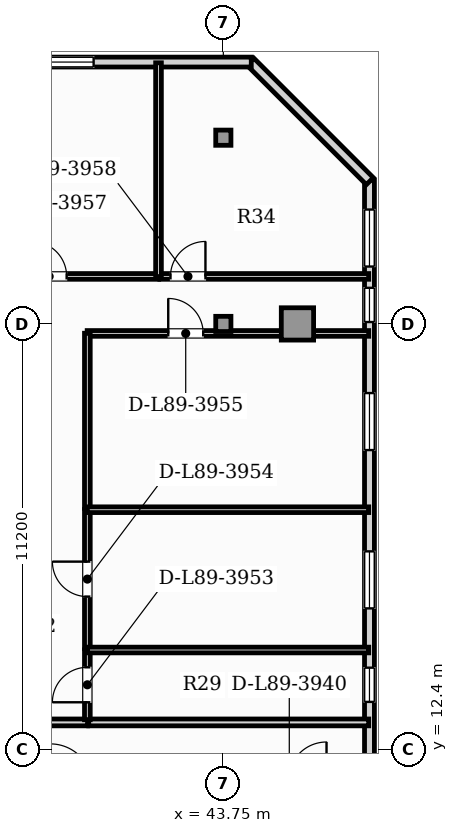
"""IFC4 building model, lengths in metres.
Left out: names, types, materials, properties, quantities, classifications, styles, units other than length and angle.
Written with IfcOpenShell. Run it as: python <this file> out.ifc"""

import sys

from ifc_helpers import new_model, si_unit, direction, frame, frame_2d, origin, origin_2d, place, context, subcontext, project, spatial, rectangle, hollow_rectangle, extrude, element, fill, save


model = new_model("IFC4")
c1 = context("Model", 3, precision=1e-05, world=origin(), true_north=direction((0.0, 1.0)))
c2 = subcontext(c1, "Body", "Model", "MODEL_VIEW")
j1 = project(units=[si_unit("LENGTHUNIT", "METRE"), si_unit("PLANEANGLEUNIT", "RADIAN")], contexts=[c1])
p1 = place(None, origin())
s1 = spatial("IfcSite", under=j1, at=p1, CompositionType="ELEMENT")
p2 = place(p1, origin())
s2 = spatial("IfcBuilding", under=s1, at=p2, CompositionType="ELEMENT")
p3 = place(p2, frame((0.0, 0.0, 362.25)))
s3 = spatial("IfcBuildingStorey", under=s2, at=p3, CompositionType="ELEMENT", Elevation=362.25)
p4 = place(p3, frame((45.7, 23.6, 0.0), z_axis=(0.0, 0.0, 1.0), x_axis=(1.0, 0.0, 0.0)))
e1 = element("IfcColumn", 1, at=p4, inside=s3, PredefinedType="USERDEFINED", context=c2, shape_type="SweptSolid", body=[
    extrude(hollow_rectangle(XDim=0.85, YDim=0.85, WallThickness=0.05, at=origin_2d()), origin(), (0.0, 0.0, 1.0), 4.35),
])
for number, where, z_axis, x_axis in (
    (2, (43.75, 23.6, 0.0), (0.0, 0.0, 1.0), (1.0, 0.0, 0.0)),
    (3, (43.75, 28.5, 0.0), (0.0, 0.0, 1.0), (1.0, 0.0, 0.0)),
):
    element("IfcColumn", number, at=place(p3, frame(where, z_axis=z_axis, x_axis=x_axis)), inside=s3, PredefinedType="COLUMN", context=c2, shape_type="SweptSolid", body=[
        extrude(hollow_rectangle(XDim=0.4, YDim=0.4, WallThickness=0.02, at=origin_2d()), origin(), (0.0, 0.0, 1.0), 4.35),
    ])
p5 = place(p3, frame((47.595, 3.24, 0.0), z_axis=(0.0, 0.0, 1.0), x_axis=(0.0, 1.0, 0.0)))
e4 = element("IfcWall", 4, at=p5, inside=s3, PredefinedType="SOLIDWALL", context=c2, shape_type="SweptSolid", body=[
    extrude(rectangle(XDim=24.14, YDim=0.26, at=frame_2d((12.07, 0.0))), origin(), (0.0, 0.0, 1.0), 4.1),
])
p6 = place(p5, frame((0.77, 0.0, 0.9)))
e5 = element("IfcOpeningElement", 5, at=p6, cuts=e4, PredefinedType="OPENING", context=c2, shape_type="SweptSolid", body=[
    extrude(rectangle(XDim=1.5, YDim=1.95, at=frame_2d((0.75, 0.975))), frame((0.0, 0.14, 0.0), z_axis=(0.0, -1.0, 0.0), x_axis=(1.0, 0.0, 0.0)), (0.0, 0.0, 1.0), 0.28),
])
p7 = place(p5, frame((20.41, 0.0, 0.95)))
e6 = element("IfcOpeningElement", 6, at=p7, cuts=e4, PredefinedType="OPENING", context=c2, shape_type="SweptSolid", body=[
    extrude(rectangle(XDim=0.9, YDim=1.5, at=frame_2d((0.45, 0.75))), frame((0.0, 0.14, 0.0), z_axis=(0.0, -1.0, 0.0), x_axis=(1.0, 0.0, 0.0)), (0.0, 0.0, 1.0), 0.28),
])
p8 = place(p5, frame((10.415, 0.0, 0.95)))
e7 = element("IfcOpeningElement", 7, at=p8, cuts=e4, PredefinedType="OPENING", context=c2, shape_type="SweptSolid", body=[
    extrude(rectangle(XDim=0.9, YDim=1.5, at=frame_2d((0.45, 0.75))), frame((0.0, 0.14, 0.0), z_axis=(0.0, -1.0, 0.0), x_axis=(1.0, 0.0, 0.0)), (0.0, 0.0, 1.0), 0.28),
])
p9 = place(p5, frame((12.876, 0.0, 0.9)))
e8 = element("IfcOpeningElement", 8, at=p9, cuts=e4, PredefinedType="OPENING", context=c2, shape_type="SweptSolid", body=[
    extrude(rectangle(XDim=1.5, YDim=1.95, at=frame_2d((0.75, 0.975))), frame((0.0, 0.14, 0.0), z_axis=(0.0, -1.0, 0.0), x_axis=(1.0, 0.0, 0.0)), (0.0, 0.0, 1.0), 0.28),
])
p10 = place(p5, frame((17.041, 0.0, 0.9)))
e9 = element("IfcOpeningElement", 9, at=p10, cuts=e4, PredefinedType="OPENING", context=c2, shape_type="SweptSolid", body=[
    extrude(rectangle(XDim=1.5, YDim=1.95, at=frame_2d((0.75, 0.975))), frame((0.0, 0.14, 0.0), z_axis=(0.0, -1.0, 0.0), x_axis=(1.0, 0.0, 0.0)), (0.0, 0.0, 1.0), 0.28),
])
p11 = place(p5, frame((21.87, 0.0, 0.9)))
e10 = element("IfcOpeningElement", 10, at=p11, cuts=e4, PredefinedType="OPENING", context=c2, shape_type="SweptSolid", body=[
    extrude(rectangle(XDim=1.5, YDim=1.95, at=frame_2d((0.75, 0.975))), frame((0.0, 0.14, 0.0), z_axis=(0.0, -1.0, 0.0), x_axis=(1.0, 0.0, 0.0)), (0.0, 0.0, 1.0), 0.28),
])
p12 = place(p3, frame((47.605, 27.356, 0.0), z_axis=(0.0, 0.0, 1.0), x_axis=(-0.707106781187, 0.707106781187, 0.0)))
e11 = element("IfcWall", 11, at=p12, inside=s3, PredefinedType="SOLIDWALL", context=c2, shape_type="SweptSolid", body=[
    extrude(rectangle(XDim=4.445, YDim=0.26, at=frame_2d((2.223, 0.0))), origin(), (0.0, 0.0, 1.0), 4.1),
])
p13 = place(p3, frame((44.485, 30.49, 0.0), z_axis=(0.0, 0.0, 1.0), x_axis=(-1.0, 0.0, 0.0)))
e12 = element("IfcWall", 12, at=p13, inside=s3, PredefinedType="SOLIDWALL", context=c2, shape_type="SweptSolid", body=[
    extrude(rectangle(XDim=8.685, YDim=0.26, at=frame_2d((4.343, 0.0))), origin(), (0.0, 0.0, 1.0), 4.1),
])
p14 = place(p13, frame((4.148, 0.0, 0.9)))
e13 = element("IfcOpeningElement", 13, at=p14, cuts=e12, PredefinedType="OPENING", context=c2, shape_type="SweptSolid", body=[
    extrude(rectangle(XDim=1.5, YDim=1.95, at=frame_2d((0.75, 0.975))), frame((0.0, 0.14, 0.0), z_axis=(0.0, -1.0, 0.0), x_axis=(1.0, 0.0, 0.0)), (0.0, 0.0, 1.0), 0.28),
])
p15 = place(p3, frame((35.187, 13.115, 0.0), z_axis=(0.0, 0.0, 1.0), x_axis=(1.0, 0.0, 0.0)))
e14 = element("IfcWall", 14, at=p15, inside=s3, PredefinedType="PARTITIONING", context=c2, shape_type="SweptSolid", body=[
    extrude(rectangle(XDim=4.99, YDim=0.18, at=frame_2d((2.495, 0.0))), origin(), (0.0, 0.0, 1.0), 4.1),
])
p16 = place(p15, frame((1.995, 0.0, 0.0)))
e15 = element("IfcOpeningElement", 15, at=p16, cuts=e14, PredefinedType="OPENING", context=c2, shape_type="SweptSolid", body=[
    extrude(rectangle(XDim=1.0, YDim=2.15, at=frame_2d((0.5, 1.075))), frame((0.0, 0.1, 0.0), z_axis=(0.0, -1.0, 0.0), x_axis=(1.0, 0.0, 0.0)), (0.0, 0.0, 1.0), 0.2),
])
p17 = place(p3, frame((40.207, 13.115, 0.0), z_axis=(0.0, 0.0, 1.0), x_axis=(1.0, 0.0, 0.0)))
e16 = element("IfcWall", 16, at=p17, inside=s3, PredefinedType="PARTITIONING", context=c2, shape_type="SweptSolid", body=[
    extrude(rectangle(XDim=7.368, YDim=0.18, at=frame_2d((3.684, 0.0))), origin(), (0.0, 0.0, 1.0), 4.1),
])
p18 = place(p3, frame((40.172, 13.185, 0.0), z_axis=(0.0, 0.0, 1.0), x_axis=(0.0, 1.0, 0.0)))
e17 = element("IfcWall", 17, at=p18, inside=s3, PredefinedType="PARTITIONING", context=c2, shape_type="SweptSolid", body=[
    extrude(rectangle(XDim=1.84, YDim=0.15, at=frame_2d((0.92, 0.0))), origin(), (0.0, 0.0, 1.0), 3.797),
])
p19 = place(p18, frame((0.46, 0.0, 0.0)))
e18 = element("IfcOpeningElement", 18, at=p19, cuts=e17, PredefinedType="OPENING", context=c2, shape_type="SweptSolid", body=[
    extrude(rectangle(XDim=0.92, YDim=2.1, at=frame_2d((0.46, 1.05))), frame((0.0, 0.085, 0.0), z_axis=(0.0, -1.0, 0.0), x_axis=(1.0, 0.0, 0.0)), (0.0, 0.0, 1.0), 0.17),
])
p20 = place(p3, frame((40.172, 15.055, 0.0), z_axis=(0.0, 0.0, 1.0), x_axis=(0.0, 1.0, 0.0)))
e19 = element("IfcWall", 19, at=p20, inside=s3, PredefinedType="PARTITIONING", context=c2, shape_type="SweptSolid", body=[
    extrude(rectangle(XDim=3.662, YDim=0.15, at=frame_2d((1.831, 0.0))), origin(), (0.0, 0.0, 1.0), 3.797),
])
p21 = place(p20, frame((1.371, 0.0, 0.0)))
e20 = element("IfcOpeningElement", 20, at=p21, cuts=e19, PredefinedType="OPENING", context=c2, shape_type="SweptSolid", body=[
    extrude(rectangle(XDim=0.92, YDim=2.1, at=frame_2d((0.46, 1.05))), frame((0.0, 0.085, 0.0), z_axis=(0.0, -1.0, 0.0), x_axis=(1.0, 0.0, 0.0)), (0.0, 0.0, 1.0), 0.17),
])
p22 = place(p3, frame((40.167, 23.35, 0.0), z_axis=(0.0, 0.0, 1.0), x_axis=(1.0, 0.0, 0.0)))
e21 = element("IfcWall", 21, at=p22, inside=s3, PredefinedType="PARTITIONING", context=c2, shape_type="SweptSolid", body=[
    extrude(rectangle(XDim=7.408, YDim=0.15, at=frame_2d((3.704, 0.0))), origin(), (0.0, 0.0, 1.0), 4.1),
])
p23 = place(p22, frame((2.133, 0.0, 0.0)))
e22 = element("IfcOpeningElement", 22, at=p23, cuts=e21, PredefinedType="OPENING", context=c2, shape_type="SweptSolid", body=[
    extrude(rectangle(XDim=0.92, YDim=2.1, at=frame_2d((0.46, 1.05))), frame((0.0, 0.085, 0.0), z_axis=(0.0, -1.0, 0.0), x_axis=(1.0, 0.0, 0.0)), (0.0, 0.0, 1.0), 0.17),
])
p24 = place(p3, frame((40.172, 18.747, 0.0), z_axis=(0.0, 0.0, 1.0), x_axis=(0.0, 1.0, 0.0)))
e23 = element("IfcWall", 23, at=p24, inside=s3, PredefinedType="PARTITIONING", context=c2, shape_type="SweptSolid", body=[
    extrude(rectangle(XDim=4.608, YDim=0.15, at=frame_2d((2.304, 0.0))), origin(), (0.0, 0.0, 1.0), 3.797),
])
p25 = place(p3, frame((36.285, 24.85, 0.0), z_axis=(0.0, 0.0, 1.0), x_axis=(1.0, 0.0, 0.0)))
e24 = element("IfcWall", 24, at=p25, inside=s3, PredefinedType="PARTITIONING", context=c2, shape_type="SweptSolid", body=[
    extrude(rectangle(XDim=5.764, YDim=0.15, at=frame_2d((2.882, 0.0))), origin(), (0.0, 0.0, 1.0), 4.1),
])
p26 = place(p25, frame((2.422, 0.0, 0.0)))
e25 = element("IfcOpeningElement", 25, at=p26, cuts=e24, PredefinedType="OPENING", context=c2, shape_type="SweptSolid", body=[
    extrude(rectangle(XDim=0.92, YDim=2.1, at=frame_2d((0.46, 1.05))), frame((0.0, 0.085, 0.0), z_axis=(0.0, -1.0, 0.0), x_axis=(1.0, 0.0, 0.0)), (0.0, 0.0, 1.0), 0.17),
])
p27 = place(p3, frame((42.079, 24.85, 0.0), z_axis=(0.0, 0.0, 1.0), x_axis=(1.0, 0.0, 0.0)))
e26 = element("IfcWall", 26, at=p27, inside=s3, PredefinedType="PARTITIONING", context=c2, shape_type="SweptSolid", body=[
    extrude(rectangle(XDim=5.496, YDim=0.15, at=frame_2d((2.748, 0.0))), origin(), (0.0, 0.0, 1.0), 4.1),
])
p28 = place(p27, frame((0.28, 0.0, 0.0)))
e27 = element("IfcOpeningElement", 27, at=p28, cuts=e26, PredefinedType="OPENING", context=c2, shape_type="SweptSolid", body=[
    extrude(rectangle(XDim=0.92, YDim=2.1, at=frame_2d((0.46, 1.05))), frame((0.0, 0.085, 0.0), z_axis=(0.0, -1.0, 0.0), x_axis=(1.0, 0.0, 0.0)), (0.0, 0.0, 1.0), 0.17),
])
for number, where, z_axis, x_axis in (
    (28, (40.167, 15.02, 0.0), (0.0, 0.0, 1.0), (1.0, 0.0, 0.0)),
    (29, (40.167, 18.712, 0.0), (0.0, 0.0, 1.0), (1.0, 0.0, 0.0)),
):
    element("IfcWall", number, at=place(p3, frame(where, z_axis=z_axis, x_axis=x_axis)), inside=s3, PredefinedType="PARTITIONING", context=c2, shape_type="SweptSolid", body=[
        extrude(rectangle(XDim=7.408, YDim=0.15, at=frame_2d((3.704, 0.0))), origin(), (0.0, 0.0, 1.0), 4.1),
    ])
p29 = place(p3, frame((42.044, 24.845, 0.0), z_axis=(0.0, 0.0, 1.0), x_axis=(0.0, 1.0, 0.0)))
e30 = element("IfcWall", 30, at=p29, inside=s3, PredefinedType="PARTITIONING", context=c2, shape_type="SweptSolid", body=[
    extrude(rectangle(XDim=5.625, YDim=0.15, at=frame_2d((2.813, 0.0))), origin(), (0.0, 0.0, 1.0), 4.1),
])
p30 = place(p7, origin())
e31 = element("IfcWindow", 31, at=p30, inside=s3, PartitioningType="SINGLE_PANEL", PredefinedType="WINDOW", context=c2, shape_type="SweptSolid", body=[
    extrude(rectangle(XDim=0.9, YDim=1.5, at=frame_2d((0.45, 0.75))), frame((0.0, 0.03, 0.0), z_axis=(0.0, -1.0, 0.0), x_axis=(1.0, 0.0, 0.0)), (0.0, 0.0, 1.0), 0.06),
])
fill(e6, e31)
p31 = place(p8, origin())
e32 = element("IfcWindow", 32, at=p31, inside=s3, PartitioningType="SINGLE_PANEL", PredefinedType="WINDOW", context=c2, shape_type="SweptSolid", body=[
    extrude(rectangle(XDim=0.9, YDim=1.5, at=frame_2d((0.45, 0.75))), frame((0.0, 0.03, 0.0), z_axis=(0.0, -1.0, 0.0), x_axis=(1.0, 0.0, 0.0)), (0.0, 0.0, 1.0), 0.06),
])
fill(e7, e32)
p32 = place(p9, origin())
e33 = element("IfcWindow", 33, at=p32, inside=s3, PartitioningType="SINGLE_PANEL", PredefinedType="WINDOW", context=c2, shape_type="SweptSolid", body=[
    extrude(rectangle(XDim=1.5, YDim=1.95, at=frame_2d((0.75, 0.975))), frame((0.0, 0.03, 0.0), z_axis=(0.0, -1.0, 0.0), x_axis=(1.0, 0.0, 0.0)), (0.0, 0.0, 1.0), 0.06),
])
fill(e8, e33)
p33 = place(p10, origin())
e34 = element("IfcWindow", 34, at=p33, inside=s3, PartitioningType="SINGLE_PANEL", PredefinedType="WINDOW", context=c2, shape_type="SweptSolid", body=[
    extrude(rectangle(XDim=1.5, YDim=1.95, at=frame_2d((0.75, 0.975))), frame((0.0, 0.03, 0.0), z_axis=(0.0, -1.0, 0.0), x_axis=(1.0, 0.0, 0.0)), (0.0, 0.0, 1.0), 0.06),
])
fill(e9, e34)
p34 = place(p14, origin())
e35 = element("IfcWindow", 35, at=p34, inside=s3, PartitioningType="SINGLE_PANEL", PredefinedType="WINDOW", context=c2, shape_type="SweptSolid", body=[
    extrude(rectangle(XDim=1.5, YDim=1.95, at=frame_2d((0.75, 0.975))), frame((0.0, 0.03, 0.0), z_axis=(0.0, -1.0, 0.0), x_axis=(1.0, 0.0, 0.0)), (0.0, 0.0, 1.0), 0.06),
])
fill(e13, e35)
p35 = place(p11, origin())
e36 = element("IfcWindow", 36, at=p35, inside=s3, PartitioningType="SINGLE_PANEL", PredefinedType="WINDOW", context=c2, shape_type="SweptSolid", body=[
    extrude(rectangle(XDim=1.5, YDim=1.95, at=frame_2d((0.75, 0.975))), frame((0.0, 0.03, 0.0), z_axis=(0.0, -1.0, 0.0), x_axis=(1.0, 0.0, 0.0)), (0.0, 0.0, 1.0), 0.06),
])
fill(e10, e36)
p36 = place(p19, origin())
e37 = element("IfcDoor", 37, at=p36, inside=s3, OperationType="SINGLE_SWING_LEFT", PredefinedType="DOOR", context=c2, shape_type="SweptSolid", body=[
    extrude(rectangle(XDim=0.92, YDim=2.1, at=frame_2d((0.46, 1.05))), frame((0.0, 0.025, 0.0), z_axis=(0.0, -1.0, 0.0), x_axis=(1.0, 0.0, 0.0)), (0.0, 0.0, 1.0), 0.05),
])
fill(e18, e37)
p37 = place(p21, origin())
e38 = element("IfcDoor", 38, at=p37, inside=s3, OperationType="SINGLE_SWING_RIGHT", PredefinedType="DOOR", context=c2, shape_type="SweptSolid", body=[
    extrude(rectangle(XDim=0.92, YDim=2.1, at=frame_2d((0.46, 1.05))), frame((0.0, 0.025, 0.0), z_axis=(0.0, -1.0, 0.0), x_axis=(1.0, 0.0, 0.0)), (0.0, 0.0, 1.0), 0.05),
])
fill(e20, e38)
p38 = place(p23, origin())
e39 = element("IfcDoor", 39, at=p38, inside=s3, OperationType="SINGLE_SWING_LEFT", PredefinedType="DOOR", context=c2, shape_type="SweptSolid", body=[
    extrude(rectangle(XDim=0.92, YDim=2.1, at=frame_2d((0.46, 1.05))), frame((0.0, 0.025, 0.0), z_axis=(0.0, -1.0, 0.0), x_axis=(1.0, 0.0, 0.0)), (0.0, 0.0, 1.0), 0.05),
])
fill(e22, e39)
p39 = place(p26, origin())
e40 = element("IfcDoor", 40, at=p39, inside=s3, OperationType="SINGLE_SWING_LEFT", PredefinedType="DOOR", context=c2, shape_type="SweptSolid", body=[
    extrude(rectangle(XDim=0.92, YDim=2.1, at=frame_2d((0.46, 1.05))), frame((0.0, 0.025, 0.0), z_axis=(0.0, -1.0, 0.0), x_axis=(1.0, 0.0, 0.0)), (0.0, 0.0, 1.0), 0.05),
])
fill(e25, e40)
p40 = place(p28, origin())
e41 = element("IfcDoor", 41, at=p40, inside=s3, OperationType="SINGLE_SWING_RIGHT", PredefinedType="DOOR", context=c2, shape_type="SweptSolid", body=[
    extrude(rectangle(XDim=0.92, YDim=2.1, at=frame_2d((0.46, 1.05))), frame((0.0, 0.025, 0.0), z_axis=(0.0, -1.0, 0.0), x_axis=(1.0, 0.0, 0.0)), (0.0, 0.0, 1.0), 0.05),
])
fill(e27, e41)
save(model, sys.argv[1])
